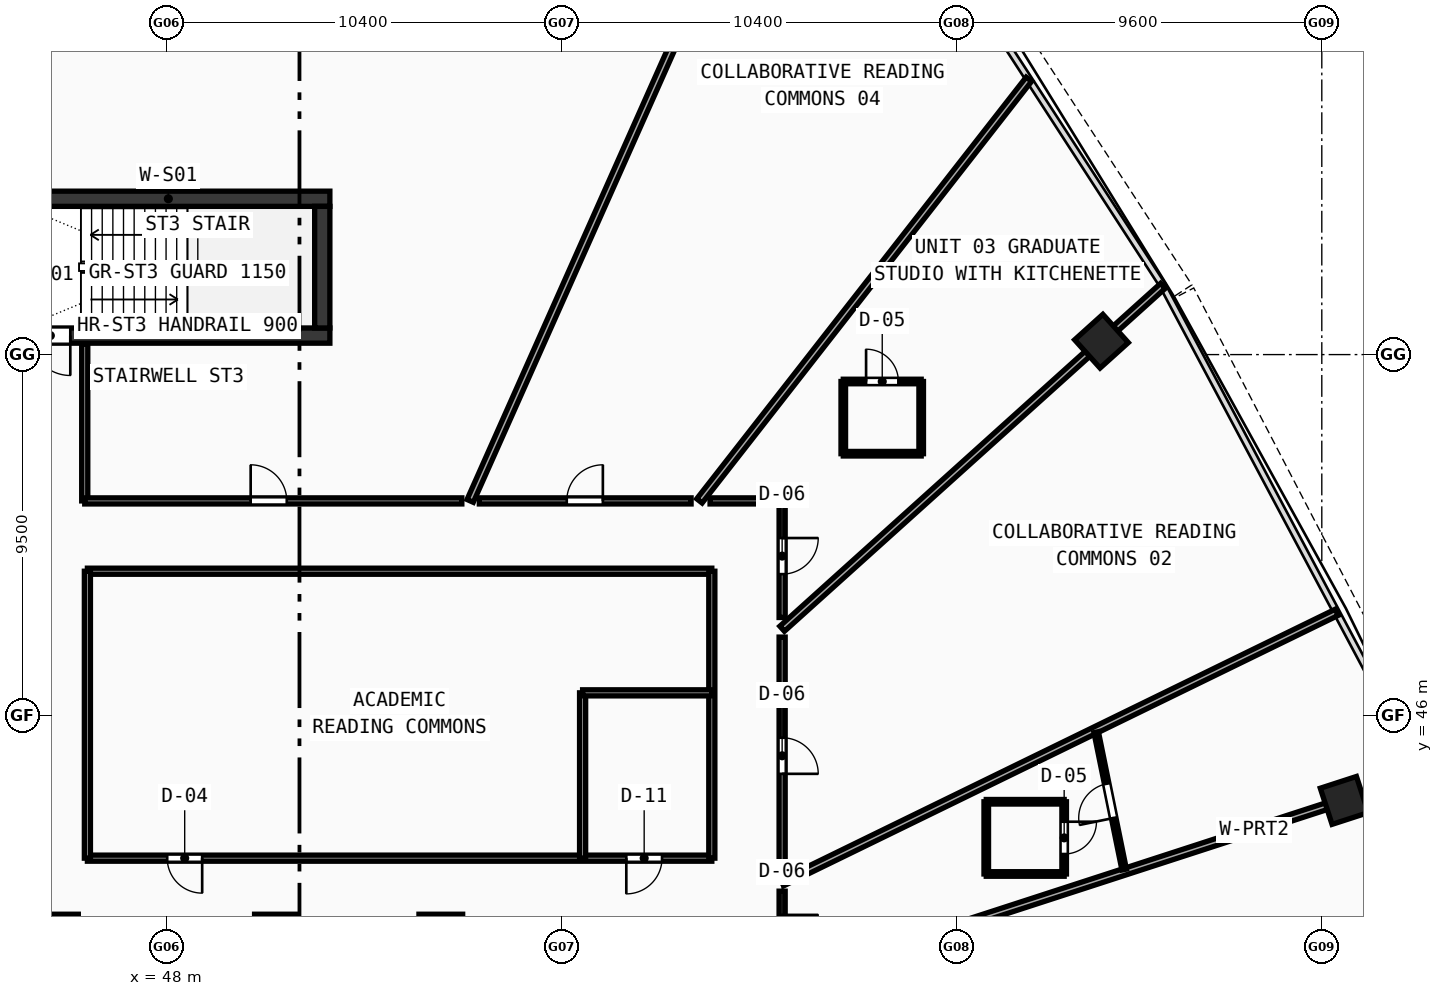
"""IFC4 building model, lengths in metres.
Left out: names, types, materials, properties, quantities, classifications, styles, units other than length and angle.
Written with IfcOpenShell. Run it as: python <this file> out.ifc"""

import sys

from ifc_helpers import new_model, si_unit, direction, frame, frame_2d, origin, origin_with_axes, origin_2d, place, context, subcontext, project, spatial, rectangle, hollow_rectangle, extrude, source, transform, mapped, element, fill, save


model = new_model("IFC4")
c1 = context("Model", 3, precision=1e-05, world=origin(), true_north=direction((0.0, 1.0)))
c2 = subcontext(c1, "Body", "Model", "MODEL_VIEW")
j1 = project(units=[si_unit("LENGTHUNIT", "METRE"), si_unit("PLANEANGLEUNIT", "RADIAN")], contexts=[c1])
p1 = place(None, origin())
s1 = spatial("IfcSite", under=j1, at=p1, CompositionType="ELEMENT")
p2 = place(p1, origin())
s2 = spatial("IfcBuilding", under=s1, at=p2, CompositionType="ELEMENT")
p3 = place(p2, frame((0.0, 0.0, 81.18)))
s3 = spatial("IfcBuildingStorey", under=s2, at=p3, CompositionType="ELEMENT", Elevation=81.18)
p4 = place(p3, frame((43.8, 59.6, 0.0), z_axis=(0.0, 0.0, 1.0), x_axis=(1.0, 0.0, 0.0)))
e1 = element("IfcWall", 1, at=p4, inside=s3, PredefinedType="SHEAR", context=c2, shape_type="SweptSolid", body=[
    extrude(rectangle(XDim=8.5, YDim=0.4, at=frame_2d((4.25, 0.0))), origin(), (0.0, 0.0, 1.0), 3.54),
])
p5 = place(p3, frame((43.8, 56.0, 0.0), z_axis=(0.0, 0.0, 1.0), x_axis=(1.0, 0.0, 0.0)))
e2 = element("IfcWall", 2, at=p5, inside=s3, PredefinedType="SHEAR", context=c2, shape_type="SweptSolid", body=[
    extrude(rectangle(XDim=8.5, YDim=0.4, at=frame_2d((4.25, 0.0))), origin(), (0.0, 0.0, 1.0), 3.54),
])
p6 = place(p5, frame((0.62, 0.0, 0.0)))
e3 = element("IfcOpeningElement", 3, at=p6, cuts=e2, PredefinedType="OPENING", context=c2, shape_type="SweptSolid", body=[
    extrude(rectangle(XDim=1.05, YDim=2.1, at=frame_2d((0.525, 1.05))), frame((0.0, 0.21, 0.0), z_axis=(0.0, -1.0, 0.0), x_axis=(1.0, 0.0, 0.0)), (0.0, 0.0, 1.0), 0.42),
])
p7 = place(p3, frame((52.1, 56.2, 0.0), z_axis=(0.0, 0.0, 1.0), x_axis=(0.0, 1.0, 0.0)))
e4 = element("IfcWall", 4, at=p7, inside=s3, PredefinedType="SHEAR", context=c2, shape_type="SweptSolid", body=[
    extrude(rectangle(XDim=3.2, YDim=0.4, at=frame_2d((1.6, 0.0))), origin(), (0.0, 0.0, 1.0), 3.54),
])
m1 = source(origin(), c2, "Body", "SweptSolid", [
    extrude(hollow_rectangle(XDim=1.15, YDim=1.15, WallThickness=0.048, at=origin_2d()), origin(), (0.0, 0.0, 1.0), 3.8),
])
for number, where, z_axis, x_axis in (
    (5, (55.219, 40.2, -0.26), (0.0, 0.0, 1.0), (1.0, 0.0, 0.0)),
    (6, (50.894, 40.2, -0.26), (0.0, 0.0, 1.0), (1.0, 0.0, 0.0)),
    (7, (45.106, 40.2, -0.26), (0.0, 0.0, 1.0), (1.0, 0.0, 0.0)),
):
    element("IfcColumn", number, at=place(p3, frame(where, z_axis=z_axis, x_axis=x_axis)), inside=s3, PredefinedType="COLUMN", context=c2, shape_type="MappedRepresentation", body=[
        mapped(m1, transform((0.0, 0.0, 0.0), scale=1.0)),
    ])
m2 = source(origin(), c2, "Body", "SweptSolid", [
    extrude(hollow_rectangle(XDim=1.0, YDim=1.0, WallThickness=0.042, at=origin_2d()), origin(), (0.0, 0.0, 1.0), 3.8),
])
for number, where, z_axis, x_axis in (
    (8, (78.991, 43.77, -0.26), (0.0, 0.0, 1.0), (-0.309, 0.951, 0.0)),
    (9, (72.603, 55.852, -0.26), (0.0, 0.0, 1.0), (-0.669, 0.743, 0.0)),
):
    element("IfcColumn", number, at=place(p3, frame(where, z_axis=z_axis, x_axis=x_axis)), inside=s3, PredefinedType="COLUMN", context=c2, shape_type="MappedRepresentation", body=[
        mapped(m2, transform((0.0, 0.0, 0.0), scale=1.0)),
    ])
p8 = place(p3, frame((45.92, 42.25, 0.0), z_axis=(0.0, 0.0, 1.0), x_axis=(1.0, 0.0, 0.0)))
e10 = element("IfcWall", 10, at=p8, inside=s3, PredefinedType="PARTITIONING", context=c2, shape_type="SweptSolid", body=[
    extrude(rectangle(XDim=16.43, YDim=0.16, at=frame_2d((8.215, 0.0))), origin(), (0.0, 0.0, 1.0), 2.84),
])
p9 = place(p8, frame((2.1, 0.0, 0.0)))
e11 = element("IfcOpeningElement", 11, at=p9, cuts=e10, PredefinedType="OPENING", context=c2, shape_type="SweptSolid", body=[
    extrude(rectangle(XDim=0.92, YDim=2.1, at=frame_2d((0.46, 1.05))), frame((0.0, 0.09, 0.0), z_axis=(0.0, -1.0, 0.0), x_axis=(1.0, 0.0, 0.0)), (0.0, 0.0, 1.0), 0.18),
])
p10 = place(p8, frame((14.18, 0.0, 0.0)))
e12 = element("IfcOpeningElement", 12, at=p10, cuts=e10, PredefinedType="OPENING", context=c2, shape_type="SweptSolid", body=[
    extrude(rectangle(XDim=0.94, YDim=2.1, at=frame_2d((0.47, 1.05))), frame((0.0, 0.09, 0.0), z_axis=(0.0, -1.0, 0.0), x_axis=(1.0, 0.0, 0.0)), (0.0, 0.0, 1.0), 0.18),
])
p11 = place(p3, frame((45.92, 49.8, 0.0), z_axis=(0.0, 0.0, 1.0), x_axis=(1.0, 0.0, 0.0)))
e13 = element("IfcWall", 13, at=p11, inside=s3, PredefinedType="PARTITIONING", context=c2, shape_type="SweptSolid", body=[
    extrude(rectangle(XDim=16.43, YDim=0.16, at=frame_2d((8.215, 0.0))), origin(), (0.0, 0.0, 1.0), 2.84),
])
p12 = place(p3, frame((45.92, 42.25, 0.0), z_axis=(0.0, 0.0, 1.0), x_axis=(0.0, 1.0, 0.0)))
e14 = element("IfcWall", 14, at=p12, inside=s3, PredefinedType="PARTITIONING", context=c2, shape_type="SweptSolid", body=[
    extrude(rectangle(XDim=7.55, YDim=0.16, at=frame_2d((3.775, 0.0))), origin(), (0.0, 0.0, 1.0), 3.54),
])
p13 = place(p3, frame((62.35, 42.25, 0.0), z_axis=(0.0, 0.0, 1.0), x_axis=(0.0, 1.0, 0.0)))
e15 = element("IfcWall", 15, at=p13, inside=s3, PredefinedType="PARTITIONING", context=c2, shape_type="SweptSolid", body=[
    extrude(rectangle(XDim=7.55, YDim=0.16, at=frame_2d((3.775, 0.0))), origin(), (0.0, 0.0, 1.0), 2.84),
])
p14 = place(p3, frame((58.95, 42.25, 0.0), z_axis=(0.0, 0.0, 1.0), x_axis=(0.0, 1.0, 0.0)))
e16 = element("IfcWall", 16, at=p14, inside=s3, PredefinedType="PARTITIONING", context=c2, shape_type="SweptSolid", body=[
    extrude(rectangle(XDim=4.35, YDim=0.16, at=frame_2d((2.175, 0.0))), origin(), (0.0, 0.0, 1.0), 2.84),
])
p15 = place(p3, frame((58.95, 46.6, 0.0), z_axis=(0.0, 0.0, 1.0), x_axis=(1.0, 0.0, 0.0)))
e17 = element("IfcWall", 17, at=p15, inside=s3, PredefinedType="PARTITIONING", context=c2, shape_type="SweptSolid", body=[
    extrude(rectangle(XDim=3.4, YDim=0.16, at=frame_2d((1.7, 0.0))), origin(), (0.0, 0.0, 1.0), 2.84),
])
p16 = place(p3, frame((64.2, 38.964, 0.0), z_axis=(0.0, 0.0, 1.0), x_axis=(0.951054301474, 0.309023810812, 0.0)))
e18 = element("IfcWall", 18, at=p16, inside=s3, PredefinedType="PARTITIONING", context=c2, shape_type="SweptSolid", body=[
    extrude(rectangle(XDim=17.733, YDim=0.18, at=frame_2d((8.867, 0.0))), origin(), (0.0, 0.0, 1.0), 2.84),
])
p17 = place(p3, frame((64.2, 41.601, 0.0), z_axis=(0.0, 0.0, 1.0), x_axis=(0.898796049991, 0.438367038588, 0.0)))
e19 = element("IfcWall", 19, at=p17, inside=s3, PredefinedType="PARTITIONING", context=c2, shape_type="SweptSolid", body=[
    extrude(rectangle(XDim=16.234, YDim=0.18, at=frame_2d((8.117, 0.0))), origin(), (0.0, 0.0, 1.0), 2.84),
])
p18 = place(p3, frame((64.2, 48.287, 0.0), z_axis=(0.0, 0.0, 1.0), x_axis=(0.743149168899, 0.669125782469, 0.0)))
e20 = element("IfcWall", 20, at=p18, inside=s3, PredefinedType="PARTITIONING", context=c2, shape_type="SweptSolid", body=[
    extrude(rectangle(XDim=13.483, YDim=0.18, at=frame_2d((6.741, 0.0))), origin(), (0.0, 0.0, 1.0), 2.84),
])
p19 = place(p3, frame((62.024, 51.65, 0.0), z_axis=(0.0, 0.0, 1.0), x_axis=(0.615647406864, 0.788021744891, 0.0)))
e21 = element("IfcWall", 21, at=p19, inside=s3, PredefinedType="PARTITIONING", context=c2, shape_type="SweptSolid", body=[
    extrude(rectangle(XDim=14.08, YDim=0.18, at=frame_2d((7.04, 0.0))), origin(), (0.0, 0.0, 1.0), 2.84),
])
p20 = place(p3, frame((55.992, 51.65, 0.0), z_axis=(0.0, 0.0, 1.0), x_axis=(0.406733854264, 0.913546699296, 0.0)))
e22 = element("IfcWall", 22, at=p20, inside=s3, PredefinedType="PARTITIONING", context=c2, shape_type="SweptSolid", body=[
    extrude(rectangle(XDim=21.911, YDim=0.18, at=frame_2d((10.956, 0.0))), origin(), (0.0, 0.0, 1.0), 2.84),
])
p21 = place(p3, frame((45.85, 55.78, 0.0), z_axis=(0.0, 0.0, 1.0), x_axis=(0.0, -1.0, 0.0)))
e23 = element("IfcWall", 23, at=p21, inside=s3, PredefinedType="PARTITIONING", context=c2, shape_type="SweptSolid", body=[
    extrude(rectangle(XDim=4.13, YDim=0.16, at=frame_2d((2.065, 0.0))), origin(), (0.0, 0.0, 1.0), 3.54),
])
p22 = place(p3, frame((45.85, 51.65, 0.0), z_axis=(0.0, 0.0, 1.0), x_axis=(1.0, 0.0, 0.0)))
e24 = element("IfcWall", 24, at=p22, inside=s3, PredefinedType="PARTITIONING", context=c2, shape_type="SweptSolid", body=[
    extrude(rectangle(XDim=9.922, YDim=0.16, at=frame_2d((4.961, 0.0))), origin(), (0.0, 0.0, 1.0), 2.84),
])
p23 = place(p22, frame((4.366, 0.0, 0.0)))
e25 = element("IfcOpeningElement", 25, at=p23, cuts=e24, PredefinedType="OPENING", context=c2, shape_type="SweptSolid", body=[
    extrude(rectangle(XDim=0.95, YDim=2.1, at=frame_2d((0.475, 1.05))), frame((0.0, 0.09, 0.0), z_axis=(0.0, -1.0, 0.0), x_axis=(1.0, 0.0, 0.0)), (0.0, 0.0, 1.0), 0.18),
])
p24 = place(p3, frame((56.233, 51.65, 0.0), z_axis=(0.0, 0.0, 1.0), x_axis=(1.0, 0.0, 0.0)))
e26 = element("IfcWall", 26, at=p24, inside=s3, PredefinedType="PARTITIONING", context=c2, shape_type="SweptSolid", body=[
    extrude(rectangle(XDim=5.572, YDim=0.16, at=frame_2d((2.786, 0.0))), origin(), (0.0, 0.0, 1.0), 3.54),
])
p25 = place(p24, frame((2.3, 0.0, 0.0)))
e27 = element("IfcOpeningElement", 27, at=p25, cuts=e26, PredefinedType="OPENING", context=c2, shape_type="SweptSolid", body=[
    extrude(rectangle(XDim=0.95, YDim=2.1, at=frame_2d((0.475, 1.05))), frame((0.0, 0.09, 0.0), z_axis=(0.0, -1.0, 0.0), x_axis=(1.0, 0.0, 0.0)), (0.0, 0.0, 1.0), 0.18),
])
p26 = place(p3, frame((62.303, 51.65, 0.0), z_axis=(0.0, 0.0, 1.0), x_axis=(1.0, 0.0, 0.0)))
e28 = element("IfcWall", 28, at=p26, inside=s3, PredefinedType="PARTITIONING", context=c2, shape_type="SweptSolid", body=[
    extrude(rectangle(XDim=1.897, YDim=0.16, at=frame_2d((0.948, 0.0))), origin(), (0.0, 0.0, 1.0), 3.54),
])
p27 = place(p3, frame((64.2, 51.65, 0.0), z_axis=(0.0, 0.0, 1.0), x_axis=(0.0, -1.0, 0.0)))
e29 = element("IfcWall", 29, at=p27, inside=s3, PredefinedType="PARTITIONING", context=c2, shape_type="SweptSolid", body=[
    extrude(rectangle(XDim=3.067, YDim=0.16, at=frame_2d((1.534, 0.0))), origin(), (0.0, 0.0, 1.0), 3.54),
])
p28 = place(p27, frame((0.977, 0.0, 0.0)))
e30 = element("IfcOpeningElement", 30, at=p28, cuts=e29, PredefinedType="OPENING", context=c2, shape_type="SweptSolid", body=[
    extrude(rectangle(XDim=0.95, YDim=2.1, at=frame_2d((0.475, 1.05))), frame((0.0, 0.09, 0.0), z_axis=(0.0, -1.0, 0.0), x_axis=(1.0, 0.0, 0.0)), (0.0, 0.0, 1.0), 0.18),
])
p29 = place(p3, frame((64.2, 48.067, 0.0), z_axis=(0.0, 0.0, 1.0), x_axis=(0.0, -1.0, 0.0)))
e31 = element("IfcWall", 31, at=p29, inside=s3, PredefinedType="PARTITIONING", context=c2, shape_type="SweptSolid", body=[
    extrude(rectangle(XDim=6.221, YDim=0.16, at=frame_2d((3.11, 0.0))), origin(), (0.0, 0.0, 1.0), 2.84),
])
p30 = place(p29, frame((2.648, 0.0, 0.0)))
e32 = element("IfcOpeningElement", 32, at=p30, cuts=e31, PredefinedType="OPENING", context=c2, shape_type="SweptSolid", body=[
    extrude(rectangle(XDim=0.95, YDim=2.1, at=frame_2d((0.475, 1.05))), frame((0.0, 0.09, 0.0), z_axis=(0.0, -1.0, 0.0), x_axis=(1.0, 0.0, 0.0)), (0.0, 0.0, 1.0), 0.18),
])
p31 = place(p3, frame((64.2, 41.382, 0.0), z_axis=(0.0, 0.0, 1.0), x_axis=(0.0, -1.0, 0.0)))
e33 = element("IfcWall", 33, at=p31, inside=s3, PredefinedType="PARTITIONING", context=c2, shape_type="SweptSolid", body=[
    extrude(rectangle(XDim=2.187, YDim=0.16, at=frame_2d((1.093, 0.0))), origin(), (0.0, 0.0, 1.0), 3.54),
])
p32 = place(p31, frame((0.624, 0.0, 0.0)))
e34 = element("IfcOpeningElement", 34, at=p32, cuts=e33, PredefinedType="OPENING", context=c2, shape_type="SweptSolid", body=[
    extrude(rectangle(XDim=0.95, YDim=2.1, at=frame_2d((0.475, 1.05))), frame((0.0, 0.09, 0.0), z_axis=(0.0, -1.0, 0.0), x_axis=(1.0, 0.0, 0.0)), (0.0, 0.0, 1.0), 0.18),
])
p33 = place(p3, frame((69.571, 41.834, 0.0), z_axis=(0.0, 0.0, 1.0), x_axis=(1.0, 0.0, 0.0)))
e35 = element("IfcWall", 35, at=p33, inside=s3, PredefinedType="PARTITIONING", context=c2, shape_type="SweptSolid", body=[
    extrude(rectangle(XDim=2.05, YDim=0.12, at=frame_2d((1.025, 0.0))), origin(), (0.0, 0.0, 1.0), 3.54),
])
p34 = place(p3, frame((71.621, 41.834, 0.0), z_axis=(0.0, 0.0, 1.0), x_axis=(0.0, 1.0, 0.0)))
e36 = element("IfcWall", 36, at=p34, inside=s3, PredefinedType="PARTITIONING", context=c2, shape_type="SweptSolid", body=[
    extrude(rectangle(XDim=1.9, YDim=0.12, at=frame_2d((0.95, 0.0))), origin(), (0.0, 0.0, 1.0), 3.14),
])
p35 = place(p34, frame((0.525, 0.0, 0.0)))
e37 = element("IfcOpeningElement", 37, at=p35, cuts=e36, PredefinedType="OPENING", context=c2, shape_type="SweptSolid", body=[
    extrude(rectangle(XDim=0.85, YDim=2.1, at=frame_2d((0.425, 1.05))), frame((0.0, 0.07, 0.0), z_axis=(0.0, -1.0, 0.0), x_axis=(1.0, 0.0, 0.0)), (0.0, 0.0, 1.0), 0.14),
])
p36 = place(p3, frame((71.621, 43.734, 0.0), z_axis=(0.0, 0.0, 1.0), x_axis=(-1.0, 0.0, 0.0)))
e38 = element("IfcWall", 38, at=p36, inside=s3, PredefinedType="PARTITIONING", context=c2, shape_type="SweptSolid", body=[
    extrude(rectangle(XDim=2.05, YDim=0.12, at=frame_2d((1.025, 0.0))), origin(), (0.0, 0.0, 1.0), 3.54),
])
p37 = place(p3, frame((69.571, 43.734, 0.0), z_axis=(0.0, 0.0, 1.0), x_axis=(0.0, -1.0, 0.0)))
e39 = element("IfcWall", 39, at=p37, inside=s3, PredefinedType="PARTITIONING", context=c2, shape_type="SweptSolid", body=[
    extrude(rectangle(XDim=1.9, YDim=0.12, at=frame_2d((0.95, 0.0))), origin(), (0.0, 0.0, 1.0), 3.54),
])
p38 = place(p3, frame((73.2, 41.951, 0.0), z_axis=(0.0, 0.0, 1.0), x_axis=(-0.199717476268, 0.979853524601, 0.0)))
e40 = element("IfcWall", 40, at=p38, inside=s3, PredefinedType="PARTITIONING", context=c2, shape_type="SweptSolid", body=[
    extrude(rectangle(XDim=3.688, YDim=0.12, at=frame_2d((1.844, 0.0))), origin(), (0.0, 0.0, 1.0), 2.84),
])
p39 = place(p38, frame((1.384, 0.0, 0.0)))
e41 = element("IfcOpeningElement", 41, at=p39, cuts=e40, PredefinedType="OPENING", context=c2, shape_type="SweptSolid", body=[
    extrude(rectangle(XDim=0.92, YDim=2.1, at=frame_2d((0.46, 1.05))), frame((0.0, 0.07, 0.0), z_axis=(0.0, -1.0, 0.0), x_axis=(1.0, 0.0, 0.0)), (0.0, 0.0, 1.0), 0.14),
])
p40 = place(p3, frame((65.809, 52.892, 0.0), z_axis=(0.0, 0.0, 1.0), x_axis=(1.0, 0.0, 0.0)))
e42 = element("IfcWall", 42, at=p40, inside=s3, PredefinedType="PARTITIONING", context=c2, shape_type="SweptSolid", body=[
    extrude(rectangle(XDim=2.05, YDim=0.12, at=frame_2d((1.025, 0.0))), origin(), (0.0, 0.0, 1.0), 3.54),
])
p41 = place(p3, frame((67.859, 52.892, 0.0), z_axis=(0.0, 0.0, 1.0), x_axis=(0.0, 1.0, 0.0)))
e43 = element("IfcWall", 43, at=p41, inside=s3, PredefinedType="PARTITIONING", context=c2, shape_type="SweptSolid", body=[
    extrude(rectangle(XDim=1.9, YDim=0.12, at=frame_2d((0.95, 0.0))), origin(), (0.0, 0.0, 1.0), 3.54),
])
p42 = place(p3, frame((67.859, 54.792, 0.0), z_axis=(0.0, 0.0, 1.0), x_axis=(-1.0, 0.0, 0.0)))
e44 = element("IfcWall", 44, at=p42, inside=s3, PredefinedType="PARTITIONING", context=c2, shape_type="SweptSolid", body=[
    extrude(rectangle(XDim=2.05, YDim=0.12, at=frame_2d((1.025, 0.0))), origin(), (0.0, 0.0, 1.0), 3.54),
])
p43 = place(p42, frame((0.6, 0.0, 0.0)))
e45 = element("IfcOpeningElement", 45, at=p43, cuts=e44, PredefinedType="OPENING", context=c2, shape_type="SweptSolid", body=[
    extrude(rectangle(XDim=0.85, YDim=2.1, at=frame_2d((0.425, 1.05))), frame((0.0, 0.07, 0.0), z_axis=(0.0, -1.0, 0.0), x_axis=(1.0, 0.0, 0.0)), (0.0, 0.0, 1.0), 0.14),
])
p44 = place(p3, frame((65.809, 54.792, 0.0), z_axis=(0.0, 0.0, 1.0), x_axis=(0.0, -1.0, 0.0)))
e46 = element("IfcWall", 46, at=p44, inside=s3, PredefinedType="PARTITIONING", context=c2, shape_type="SweptSolid", body=[
    extrude(rectangle(XDim=1.9, YDim=0.12, at=frame_2d((0.95, 0.0))), origin(), (0.0, 0.0, 1.0), 3.54),
])
m3 = source(origin(), c2, "Body", "SweptSolid", [
    extrude(rectangle(XDim=1.05, YDim=2.1, at=frame_2d((0.525, 1.05))), frame((0.0, 0.025, 0.0), z_axis=(0.0, -1.0, 0.0), x_axis=(1.0, 0.0, 0.0)), (0.0, 0.0, 1.0), 0.05),
])
p45 = place(p6, frame((1.05, 0.0, 0.0), z_axis=(0.0, 0.0, 1.0), x_axis=(-1.0, 0.0, 0.0)))
e47 = element("IfcDoor", 47, at=p45, inside=s3, OperationType="SINGLE_SWING_LEFT", PredefinedType="DOOR", context=c2, shape_type="MappedRepresentation", body=[
    mapped(m3, transform((0.0, 0.0, 0.0), scale=1.0)),
])
fill(e3, e47)
m4 = source(origin(), c2, "Body", "SweptSolid", [
    extrude(rectangle(XDim=0.92, YDim=2.1, at=frame_2d((0.46, 1.05))), frame((0.0, 0.025, 0.0), z_axis=(0.0, -1.0, 0.0), x_axis=(1.0, 0.0, 0.0)), (0.0, 0.0, 1.0), 0.05),
])
p46 = place(p9, frame((0.92, 0.0, 0.0), z_axis=(0.0, 0.0, 1.0), x_axis=(-1.0, 0.0, 0.0)))
e48 = element("IfcDoor", 48, at=p46, inside=s3, OperationType="SINGLE_SWING_LEFT", PredefinedType="DOOR", context=c2, shape_type="MappedRepresentation", body=[
    mapped(m4, transform((0.0, 0.0, 0.0), scale=1.0)),
])
fill(e11, e48)
m5 = source(origin(), c2, "Body", "SweptSolid", [
    extrude(rectangle(XDim=0.94, YDim=2.1, at=frame_2d((0.47, 1.05))), frame((0.0, 0.025, 0.0), z_axis=(0.0, -1.0, 0.0), x_axis=(1.0, 0.0, 0.0)), (0.0, 0.0, 1.0), 0.05),
])
p47 = place(p10, frame((0.94, 0.0, 0.0), z_axis=(0.0, 0.0, 1.0), x_axis=(-1.0, 0.0, 0.0)))
e49 = element("IfcDoor", 49, at=p47, inside=s3, OperationType="SINGLE_SWING_RIGHT", PredefinedType="DOOR", context=c2, shape_type="MappedRepresentation", body=[
    mapped(m5, transform((0.0, 0.0, 0.0), scale=1.0)),
])
fill(e12, e49)
m6 = source(origin(), c2, "Body", "SweptSolid", [
    extrude(rectangle(XDim=0.95, YDim=2.1, at=frame_2d((0.475, 1.05))), frame((0.0, 0.025, 0.0), z_axis=(0.0, -1.0, 0.0), x_axis=(1.0, 0.0, 0.0)), (0.0, 0.0, 1.0), 0.05),
])
p48 = place(p32, origin_with_axes())
e50 = element("IfcDoor", 50, at=p48, inside=s3, OperationType="SINGLE_SWING_LEFT", PredefinedType="DOOR", context=c2, shape_type="MappedRepresentation", body=[
    mapped(m6, transform((0.0, 0.0, 0.0), scale=1.0)),
])
fill(e34, e50)
m7 = source(origin(), c2, "Body", "SweptSolid", [
    extrude(rectangle(XDim=0.85, YDim=2.1, at=frame_2d((0.425, 1.05))), frame((0.0, 0.025, 0.0), z_axis=(0.0, -1.0, 0.0), x_axis=(1.0, 0.0, 0.0)), (0.0, 0.0, 1.0), 0.05),
])
p49 = place(p35, frame((0.85, 0.0, 0.0), z_axis=(0.0, 0.0, 1.0), x_axis=(-1.0, 0.0, 0.0)))
e51 = element("IfcDoor", 51, at=p49, inside=s3, OperationType="SINGLE_SWING_LEFT", PredefinedType="DOOR", context=c2, shape_type="MappedRepresentation", body=[
    mapped(m7, transform((0.0, 0.0, 0.0), scale=1.0)),
])
fill(e37, e51)
p50 = place(p39, origin_with_axes())
e52 = element("IfcDoor", 52, at=p50, inside=s3, OperationType="SINGLE_SWING_LEFT", PredefinedType="DOOR", context=c2, shape_type="MappedRepresentation", body=[
    mapped(m4, transform((0.0, 0.0, 0.0), scale=1.0)),
])
fill(e41, e52)
p51 = place(p30, origin_with_axes())
e53 = element("IfcDoor", 53, at=p51, inside=s3, OperationType="SINGLE_SWING_RIGHT", PredefinedType="DOOR", context=c2, shape_type="MappedRepresentation", body=[
    mapped(m6, transform((0.0, 0.0, 0.0), scale=1.0)),
])
fill(e32, e53)
p52 = place(p28, origin_with_axes())
e54 = element("IfcDoor", 54, at=p52, inside=s3, OperationType="SINGLE_SWING_LEFT", PredefinedType="DOOR", context=c2, shape_type="MappedRepresentation", body=[
    mapped(m6, transform((0.0, 0.0, 0.0), scale=1.0)),
])
fill(e30, e54)
p53 = place(p43, frame((0.85, 0.0, 0.0), z_axis=(0.0, 0.0, 1.0), x_axis=(-1.0, 0.0, 0.0)))
e55 = element("IfcDoor", 55, at=p53, inside=s3, OperationType="SINGLE_SWING_LEFT", PredefinedType="DOOR", context=c2, shape_type="MappedRepresentation", body=[
    mapped(m7, transform((0.0, 0.0, 0.0), scale=1.0)),
])
fill(e45, e55)
p54 = place(p25, origin_with_axes())
e56 = element("IfcDoor", 56, at=p54, inside=s3, OperationType="SINGLE_SWING_RIGHT", PredefinedType="DOOR", context=c2, shape_type="MappedRepresentation", body=[
    mapped(m6, transform((0.0, 0.0, 0.0), scale=1.0)),
])
fill(e27, e56)
p55 = place(p23, origin_with_axes())
e57 = element("IfcDoor", 57, at=p55, inside=s3, OperationType="SINGLE_SWING_LEFT", PredefinedType="DOOR", context=c2, shape_type="MappedRepresentation", body=[
    mapped(m6, transform((0.0, 0.0, 0.0), scale=1.0)),
])
fill(e25, e57)
save(model, sys.argv[1])
